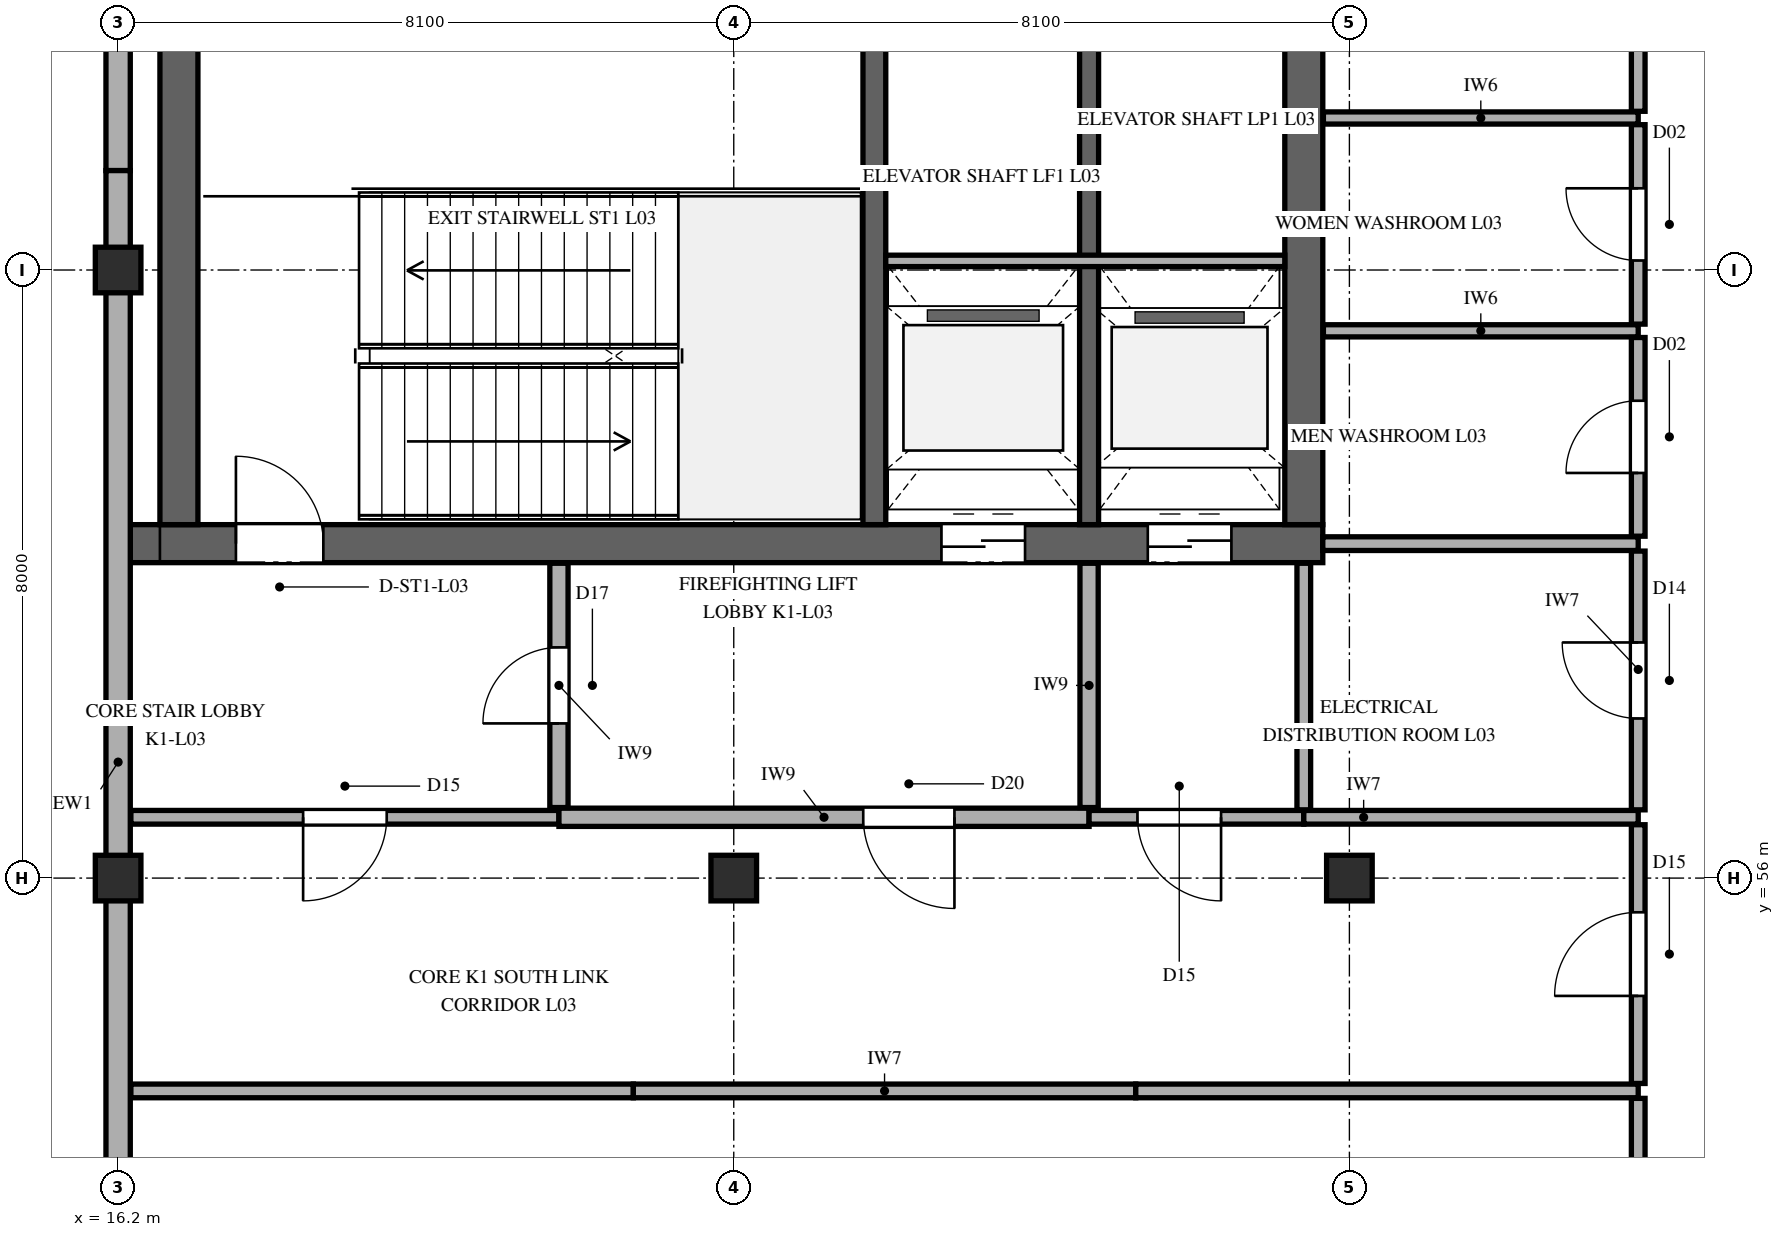
"""IFC4 building model, lengths in metres.
Left out: names, types, materials, properties, quantities, classifications, styles, units other than length and angle.
Written with IfcOpenShell. Run it as: python <this file> out.ifc"""

import sys

from ifc_helpers import new_model, si_unit, direction, frame, frame_2d, origin, origin_2d, place, context, subcontext, project, spatial, rectangle, extrude, element, fill, save


model = new_model("IFC4")
c1 = context("Model", 3, precision=1e-05, world=origin(), true_north=direction((0.0, 1.0)))
c2 = subcontext(c1, "Body", "Model", "MODEL_VIEW")
j1 = project(units=[si_unit("LENGTHUNIT", "METRE"), si_unit("PLANEANGLEUNIT", "RADIAN")], contexts=[c1])
p1 = place(None, origin())
s1 = spatial("IfcSite", under=j1, at=p1, CompositionType="ELEMENT")
p2 = place(p1, origin())
s2 = spatial("IfcBuilding", under=s1, at=p2, CompositionType="ELEMENT")
p3 = place(p2, frame((0.0, 0.0, 14.7)))
s3 = spatial("IfcBuildingStorey", under=s2, at=p3, CompositionType="ELEMENT", Elevation=14.7)
p4 = place(p3, frame((16.36, 60.4, 0.0), z_axis=(0.0, 0.0, 1.0), x_axis=(1.0, 0.0, 0.0)))
e1 = element("IfcWall", 1, at=p4, inside=s3, PredefinedType="SHEAR", context=c2, shape_type="SweptSolid", body=[
    extrude(rectangle(XDim=15.69, YDim=0.5, at=frame_2d((7.845, 0.0))), origin(), (0.0, 0.0, 1.0), 5.1),
])
p5 = place(p4, frame((1.39, 0.0, 0.0)))
e2 = element("IfcOpeningElement", 2, at=p5, cuts=e1, PredefinedType="OPENING", context=c2, shape_type="SweptSolid", body=[
    extrude(rectangle(XDim=1.15, YDim=2.25, at=frame_2d((0.575, 1.125))), frame((0.0, 0.26, 0.0), z_axis=(0.0, -1.0, 0.0), x_axis=(1.0, 0.0, 0.0)), (0.0, 0.0, 1.0), 0.52),
])
p6 = place(p4, frame((10.673, 0.0, 0.0)))
e3 = element("IfcOpeningElement", 3, at=p6, cuts=e1, PredefinedType="OPENING", context=c2, shape_type="SweptSolid", body=[
    extrude(rectangle(XDim=1.1, YDim=2.2, at=frame_2d((0.55, 1.1))), frame((0.0, 0.26, 0.0), z_axis=(0.0, -1.0, 0.0), x_axis=(1.0, 0.0, 0.0)), (0.0, 0.0, 1.0), 0.52),
])
p7 = place(p4, frame((13.387, 0.0, 0.0)))
e4 = element("IfcOpeningElement", 4, at=p7, cuts=e1, PredefinedType="OPENING", context=c2, shape_type="SweptSolid", body=[
    extrude(rectangle(XDim=1.1, YDim=2.2, at=frame_2d((0.55, 1.1))), frame((0.0, 0.26, 0.0), z_axis=(0.0, -1.0, 0.0), x_axis=(1.0, 0.0, 0.0)), (0.0, 0.0, 1.0), 0.52),
])
for number, where, z_axis, x_axis in (
    (5, (17.0, 60.65, 0.0), (0.0, 0.0, 1.0), (0.0, 1.0, 0.0)),
    (6, (31.8, 60.65, 0.0), (0.0, 0.0, 1.0), (0.0, 1.0, 0.0)),
):
    element("IfcWall", number, at=place(p3, frame(where, z_axis=z_axis, x_axis=x_axis)), inside=s3, PredefinedType="SHEAR", context=c2, shape_type="SweptSolid", body=[
        extrude(rectangle(XDim=7.9, YDim=0.5, at=frame_2d((3.95, 0.0))), origin(), (0.0, 0.0, 1.0), 5.1),
    ])
p8 = place(p3, frame((26.15, 60.65, 0.0), z_axis=(0.0, 0.0, 1.0), x_axis=(0.0, 1.0, 0.0)))
e7 = element("IfcWall", 7, at=p8, inside=s3, PredefinedType="SHEAR", context=c2, shape_type="SweptSolid", body=[
    extrude(rectangle(XDim=7.9, YDim=0.3, at=frame_2d((3.95, 0.0))), origin(), (0.0, 0.0, 1.0), 5.1),
])
p9 = place(p3, frame((28.975, 60.65, 0.0), z_axis=(0.0, 0.0, 1.0), x_axis=(0.0, 1.0, 0.0)))
e8 = element("IfcWall", 8, at=p9, inside=s3, PredefinedType="SHEAR", context=c2, shape_type="SweptSolid", body=[
    extrude(rectangle(XDim=7.9, YDim=0.25, at=frame_2d((3.95, 0.0))), origin(), (0.0, 0.0, 1.0), 5.1),
])
for number, where, z_axis, x_axis in (
    (9, (16.2, 56.0, 0.0), (0.0, 0.0, 1.0), (1.0, 0.0, 0.0)),
    (10, (16.2, 64.0, 0.0), (0.0, 0.0, 1.0), (1.0, 0.0, 0.0)),
    (11, (24.3, 56.0, 0.0), (0.0, 0.0, 1.0), (1.0, 0.0, 0.0)),
    (12, (32.4, 56.0, 0.0), (0.0, 0.0, 1.0), (1.0, 0.0, 0.0)),
):
    element("IfcColumn", number, at=place(p3, frame(where, z_axis=z_axis, x_axis=x_axis)), inside=s3, PredefinedType="COLUMN", context=c2, shape_type="SweptSolid", body=[
        extrude(rectangle(XDim=0.6, YDim=0.6, at=origin_2d()), origin(), (0.0, 0.0, 1.0), 5.1),
    ])
p10 = place(p3, frame((16.2, 80.872, 0.0), z_axis=(0.0, 0.0, 1.0), x_axis=(0.0, -1.0, 0.0)))
e13 = element("IfcWall", 13, at=p10, inside=s3, PredefinedType="SOLIDWALL", context=c2, shape_type="SweptSolid", body=[
    extrude(rectangle(XDim=15.564, YDim=0.32, at=frame_2d((7.782, 0.0))), origin(), (0.0, 0.0, 1.0), 4.332),
])
p11 = place(p10, frame((3.6, 0.0, 0.95)))
e14 = element("IfcOpeningElement", 14, at=p11, cuts=e13, PredefinedType="OPENING", context=c2, shape_type="SweptSolid", body=[
    extrude(rectangle(XDim=3.6, YDim=1.8, at=frame_2d((1.8, 0.9))), frame((0.0, 0.17, 0.0), z_axis=(0.0, -1.0, 0.0), x_axis=(1.0, 0.0, 0.0)), (0.0, 0.0, 1.0), 0.34),
])
p12 = place(p3, frame((16.2, 65.308, 0.0), z_axis=(0.0, 0.0, 1.0), x_axis=(0.0, -1.0, 0.0)))
e15 = element("IfcWall", 15, at=p12, inside=s3, PredefinedType="SOLIDWALL", context=c2, shape_type="SweptSolid", body=[
    extrude(rectangle(XDim=15.564, YDim=0.32, at=frame_2d((7.782, 0.0))), origin(), (0.0, 0.0, 1.0), 4.332),
])
p13 = place(p3, frame((26.3, 64.12, 0.0), z_axis=(0.0, 0.0, 1.0), x_axis=(1.0, 0.0, 0.0)))
e16 = element("IfcWall", 16, at=p13, inside=s3, PredefinedType="PARTITIONING", context=c2, shape_type="SweptSolid", body=[
    extrude(rectangle(XDim=5.25, YDim=0.15, at=frame_2d((2.625, 0.0))), origin(), (0.0, 0.0, 1.0), 4.84),
])
p14 = place(p3, frame((16.368, 53.2, 0.0), z_axis=(0.0, 0.0, 1.0), x_axis=(1.0, 0.0, 0.0)))
e17 = element("IfcWall", 17, at=p14, inside=s3, PredefinedType="PARTITIONING", context=c2, shape_type="SweptSolid", body=[
    extrude(rectangle(XDim=6.611, YDim=0.18, at=frame_2d((3.305, 0.0))), origin(), (0.0, 0.0, 1.0), 4.84),
])
for number, where, z_axis, x_axis in (
    (18, (22.979, 53.2, 0.0), (0.0, 0.0, 1.0), (1.0, 0.0, 0.0)),
    (19, (29.589, 53.2, 0.0), (0.0, 0.0, 1.0), (1.0, 0.0, 0.0)),
):
    element("IfcWall", number, at=place(p3, frame(where, z_axis=z_axis, x_axis=x_axis)), inside=s3, PredefinedType="PARTITIONING", context=c2, shape_type="SweptSolid", body=[
        extrude(rectangle(XDim=6.611, YDim=0.18, at=frame_2d((3.305, 0.0))), origin(), (0.0, 0.0, 1.0), 4.84),
    ])
p15 = place(p3, frame((16.368, 56.8, 0.0), z_axis=(0.0, 0.0, 1.0), x_axis=(1.0, 0.0, 0.0)))
e20 = element("IfcWall", 20, at=p15, inside=s3, PredefinedType="PARTITIONING", context=c2, shape_type="SweptSolid", body=[
    extrude(rectangle(XDim=5.632, YDim=0.18, at=frame_2d((2.816, 0.0))), origin(), (0.0, 0.0, 1.0), 4.84),
])
p16 = place(p15, frame((2.266, 0.0, 0.0)))
e21 = element("IfcOpeningElement", 21, at=p16, cuts=e20, PredefinedType="OPENING", context=c2, shape_type="SweptSolid", body=[
    extrude(rectangle(XDim=1.1, YDim=2.2, at=frame_2d((0.55, 1.1))), frame((0.0, 0.1, 0.0), z_axis=(0.0, -1.0, 0.0), x_axis=(1.0, 0.0, 0.0)), (0.0, 0.0, 1.0), 0.2),
])
p17 = place(p3, frame((22.0, 56.8, 0.0), z_axis=(0.0, 0.0, 1.0), x_axis=(1.0, 0.0, 0.0)))
e22 = element("IfcWall", 22, at=p17, inside=s3, PredefinedType="PARTITIONING", context=c2, shape_type="SweptSolid", body=[
    extrude(rectangle(XDim=6.975, YDim=0.24, at=frame_2d((3.488, 0.0))), origin(), (0.0, 0.0, 1.0), 4.84),
])
p18 = place(p17, frame((4.003, 0.0, 0.0)))
e23 = element("IfcOpeningElement", 23, at=p18, cuts=e22, PredefinedType="OPENING", context=c2, shape_type="SweptSolid", body=[
    extrude(rectangle(XDim=1.2, YDim=2.3, at=frame_2d((0.6, 1.15))), frame((0.0, 0.13, 0.0), z_axis=(0.0, -1.0, 0.0), x_axis=(1.0, 0.0, 0.0)), (0.0, 0.0, 1.0), 0.26),
])
p19 = place(p3, frame((28.975, 56.8, 0.0), z_axis=(0.0, 0.0, 1.0), x_axis=(1.0, 0.0, 0.0)))
e24 = element("IfcWall", 24, at=p19, inside=s3, PredefinedType="PARTITIONING", context=c2, shape_type="SweptSolid", body=[
    extrude(rectangle(XDim=2.825, YDim=0.18, at=frame_2d((1.413, 0.0))), origin(), (0.0, 0.0, 1.0), 4.84),
])
p20 = place(p19, frame((0.636, 0.0, 0.0)))
e25 = element("IfcOpeningElement", 25, at=p20, cuts=e24, PredefinedType="OPENING", context=c2, shape_type="SweptSolid", body=[
    extrude(rectangle(XDim=1.1, YDim=2.2, at=frame_2d((0.55, 1.1))), frame((0.0, 0.1, 0.0), z_axis=(0.0, -1.0, 0.0), x_axis=(1.0, 0.0, 0.0)), (0.0, 0.0, 1.0), 0.2),
])
p21 = place(p3, frame((31.8, 56.8, 0.0), z_axis=(0.0, 0.0, 1.0), x_axis=(1.0, 0.0, 0.0)))
e26 = element("IfcWall", 26, at=p21, inside=s3, PredefinedType="PARTITIONING", context=c2, shape_type="SweptSolid", body=[
    extrude(rectangle(XDim=4.4, YDim=0.18, at=frame_2d((2.2, 0.0))), origin(), (0.0, 0.0, 1.0), 4.84),
])
p22 = place(p3, frame((32.05, 60.4, 0.0), z_axis=(0.0, 0.0, 1.0), x_axis=(1.0, 0.0, 0.0)))
e27 = element("IfcWall", 27, at=p22, inside=s3, PredefinedType="PARTITIONING", context=c2, shape_type="SweptSolid", body=[
    extrude(rectangle(XDim=4.15, YDim=0.18, at=frame_2d((2.075, 0.0))), origin(), (0.0, 0.0, 1.0), 4.84),
])
for number, where, z_axis, x_axis in (
    (28, (32.058, 63.2, 0.0), (0.0, 0.0, 1.0), (1.0, 0.0, 0.0)),
    (29, (32.058, 66.0, 0.0), (0.0, 0.0, 1.0), (1.0, 0.0, 0.0)),
):
    element("IfcWall", number, at=place(p3, frame(where, z_axis=z_axis, x_axis=x_axis)), inside=s3, PredefinedType="PARTITIONING", context=c2, shape_type="SweptSolid", body=[
        extrude(rectangle(XDim=4.142, YDim=0.16, at=frame_2d((2.071, 0.0))), origin(), (0.0, 0.0, 1.0), 4.84),
    ])
p23 = place(p3, frame((22.0, 56.928, 0.0), z_axis=(0.0, 0.0, 1.0), x_axis=(0.0, 1.0, 0.0)))
e30 = element("IfcWall", 30, at=p23, inside=s3, PredefinedType="PARTITIONING", context=c2, shape_type="SweptSolid", body=[
    extrude(rectangle(XDim=3.214, YDim=0.24, at=frame_2d((1.607, 0.0))), origin(), (0.0, 0.0, 1.0), 4.84),
])
p24 = place(p23, frame((1.107, 0.0, 0.0)))
e31 = element("IfcOpeningElement", 31, at=p24, cuts=e30, PredefinedType="OPENING", context=c2, shape_type="SweptSolid", body=[
    extrude(rectangle(XDim=1.0, YDim=2.2, at=frame_2d((0.5, 1.1))), frame((0.0, 0.13, 0.0), z_axis=(0.0, -1.0, 0.0), x_axis=(1.0, 0.0, 0.0)), (0.0, 0.0, 1.0), 0.26),
])
p25 = place(p3, frame((28.975, 56.928, 0.0), z_axis=(0.0, 0.0, 1.0), x_axis=(0.0, 1.0, 0.0)))
e32 = element("IfcWall", 32, at=p25, inside=s3, PredefinedType="PARTITIONING", context=c2, shape_type="SweptSolid", body=[
    extrude(rectangle(XDim=3.214, YDim=0.24, at=frame_2d((1.607, 0.0))), origin(), (0.0, 0.0, 1.0), 4.84),
])
p26 = place(p3, frame((31.8, 56.898, 0.0), z_axis=(0.0, 0.0, 1.0), x_axis=(0.0, 1.0, 0.0)))
e33 = element("IfcWall", 33, at=p26, inside=s3, PredefinedType="PARTITIONING", context=c2, shape_type="SweptSolid", body=[
    extrude(rectangle(XDim=3.244, YDim=0.18, at=frame_2d((1.622, 0.0))), origin(), (0.0, 0.0, 1.0), 4.84),
])
p27 = place(p3, frame((36.2, 34.098, 0.0), z_axis=(0.0, 0.0, 1.0), x_axis=(0.0, 1.0, 0.0)))
e34 = element("IfcWall", 34, at=p27, inside=s3, PredefinedType="PARTITIONING", context=c2, shape_type="SweptSolid", body=[
    extrude(rectangle(XDim=19.004, YDim=0.18, at=frame_2d((9.502, 0.0))), origin(), (0.0, 0.0, 1.0), 4.425),
])
p28 = place(p27, frame((8.952, 0.0, 0.0)))
e35 = element("IfcOpeningElement", 35, at=p28, cuts=e34, PredefinedType="OPENING", context=c2, shape_type="SweptSolid", body=[
    extrude(rectangle(XDim=1.1, YDim=2.2, at=frame_2d((0.55, 1.1))), frame((0.0, 0.1, 0.0), z_axis=(0.0, -1.0, 0.0), x_axis=(1.0, 0.0, 0.0)), (0.0, 0.0, 1.0), 0.2),
])
p29 = place(p3, frame((36.2, 53.298, 0.0), z_axis=(0.0, 0.0, 1.0), x_axis=(0.0, 1.0, 0.0)))
e36 = element("IfcWall", 36, at=p29, inside=s3, PredefinedType="PARTITIONING", context=c2, shape_type="SweptSolid", body=[
    extrude(rectangle(XDim=3.404, YDim=0.18, at=frame_2d((1.702, 0.0))), origin(), (0.0, 0.0, 1.0), 4.425),
])
p30 = place(p29, frame((1.152, 0.0, 0.0)))
e37 = element("IfcOpeningElement", 37, at=p30, cuts=e36, PredefinedType="OPENING", context=c2, shape_type="SweptSolid", body=[
    extrude(rectangle(XDim=1.1, YDim=2.2, at=frame_2d((0.55, 1.1))), frame((0.0, 0.1, 0.0), z_axis=(0.0, -1.0, 0.0), x_axis=(1.0, 0.0, 0.0)), (0.0, 0.0, 1.0), 0.2),
])
p31 = place(p3, frame((36.2, 56.898, 0.0), z_axis=(0.0, 0.0, 1.0), x_axis=(0.0, 1.0, 0.0)))
e38 = element("IfcWall", 38, at=p31, inside=s3, PredefinedType="PARTITIONING", context=c2, shape_type="SweptSolid", body=[
    extrude(rectangle(XDim=3.404, YDim=0.18, at=frame_2d((1.702, 0.0))), origin(), (0.0, 0.0, 1.0), 4.84),
])
p32 = place(p31, frame((1.202, 0.0, 0.0)))
e39 = element("IfcOpeningElement", 39, at=p32, cuts=e38, PredefinedType="OPENING", context=c2, shape_type="SweptSolid", body=[
    extrude(rectangle(XDim=1.0, YDim=2.15, at=frame_2d((0.5, 1.075))), frame((0.0, 0.1, 0.0), z_axis=(0.0, -1.0, 0.0), x_axis=(1.0, 0.0, 0.0)), (0.0, 0.0, 1.0), 0.2),
])
p33 = place(p3, frame((36.2, 60.498, 0.0), z_axis=(0.0, 0.0, 1.0), x_axis=(0.0, 1.0, 0.0)))
e40 = element("IfcWall", 40, at=p33, inside=s3, PredefinedType="PARTITIONING", context=c2, shape_type="SweptSolid", body=[
    extrude(rectangle(XDim=2.614, YDim=0.18, at=frame_2d((1.307, 0.0))), origin(), (0.0, 0.0, 1.0), 4.84),
])
p34 = place(p33, frame((0.832, 0.0, 0.0)))
e41 = element("IfcOpeningElement", 41, at=p34, cuts=e40, PredefinedType="OPENING", context=c2, shape_type="SweptSolid", body=[
    extrude(rectangle(XDim=0.95, YDim=2.1, at=frame_2d((0.475, 1.05))), frame((0.0, 0.1, 0.0), z_axis=(0.0, -1.0, 0.0), x_axis=(1.0, 0.0, 0.0)), (0.0, 0.0, 1.0), 0.2),
])
p35 = place(p3, frame((36.2, 63.288, 0.0), z_axis=(0.0, 0.0, 1.0), x_axis=(0.0, 1.0, 0.0)))
e42 = element("IfcWall", 42, at=p35, inside=s3, PredefinedType="PARTITIONING", context=c2, shape_type="SweptSolid", body=[
    extrude(rectangle(XDim=2.624, YDim=0.18, at=frame_2d((1.312, 0.0))), origin(), (0.0, 0.0, 1.0), 4.84),
])
p36 = place(p35, frame((0.837, 0.0, 0.0)))
e43 = element("IfcOpeningElement", 43, at=p36, cuts=e42, PredefinedType="OPENING", context=c2, shape_type="SweptSolid", body=[
    extrude(rectangle(XDim=0.95, YDim=2.1, at=frame_2d((0.475, 1.05))), frame((0.0, 0.1, 0.0), z_axis=(0.0, -1.0, 0.0), x_axis=(1.0, 0.0, 0.0)), (0.0, 0.0, 1.0), 0.2),
])
p37 = place(p3, frame((36.2, 66.088, 0.0), z_axis=(0.0, 0.0, 1.0), x_axis=(0.0, 1.0, 0.0)))
e44 = element("IfcWall", 44, at=p37, inside=s3, PredefinedType="PARTITIONING", context=c2, shape_type="SweptSolid", body=[
    extrude(rectangle(XDim=2.624, YDim=0.18, at=frame_2d((1.312, 0.0))), origin(), (0.0, 0.0, 1.0), 4.84),
])
p38 = place(p37, frame((0.812, 0.0, 0.0)))
e45 = element("IfcOpeningElement", 45, at=p38, cuts=e44, PredefinedType="OPENING", context=c2, shape_type="SweptSolid", body=[
    extrude(rectangle(XDim=1.0, YDim=2.15, at=frame_2d((0.5, 1.075))), frame((0.0, 0.1, 0.0), z_axis=(0.0, -1.0, 0.0), x_axis=(1.0, 0.0, 0.0)), (0.0, 0.0, 1.0), 0.2),
])
p39 = place(p5, origin())
e46 = element("IfcDoor", 46, at=p39, inside=s3, OperationType="SINGLE_SWING_LEFT", PredefinedType="DOOR", context=c2, shape_type="SweptSolid", body=[
    extrude(rectangle(XDim=1.15, YDim=2.25, at=frame_2d((0.575, 1.125))), frame((0.0, 0.025, 0.0), z_axis=(0.0, -1.0, 0.0), x_axis=(1.0, 0.0, 0.0)), (0.0, 0.0, 1.0), 0.05),
])
fill(e2, e46)
p40 = place(p6, frame((1.1, 0.0, 0.0), z_axis=(0.0, 0.0, 1.0), x_axis=(-1.0, 0.0, 0.0)))
e47 = element("IfcDoor", 47, at=p40, inside=s3, OperationType="DOUBLE_DOOR_SLIDING", PredefinedType="DOOR", context=c2, shape_type="SweptSolid", body=[
    extrude(rectangle(XDim=1.1, YDim=2.2, at=frame_2d((0.55, 1.1))), frame((0.0, 0.025, 0.0), z_axis=(0.0, -1.0, 0.0), x_axis=(1.0, 0.0, 0.0)), (0.0, 0.0, 1.0), 0.05),
])
fill(e3, e47)
p41 = place(p7, frame((1.1, 0.0, 0.0), z_axis=(0.0, 0.0, 1.0), x_axis=(-1.0, 0.0, 0.0)))
e48 = element("IfcDoor", 48, at=p41, inside=s3, OperationType="DOUBLE_DOOR_SLIDING", PredefinedType="DOOR", context=c2, shape_type="SweptSolid", body=[
    extrude(rectangle(XDim=1.1, YDim=2.2, at=frame_2d((0.55, 1.1))), frame((0.0, 0.025, 0.0), z_axis=(0.0, -1.0, 0.0), x_axis=(1.0, 0.0, 0.0)), (0.0, 0.0, 1.0), 0.05),
])
fill(e4, e48)
p42 = place(p16, frame((1.1, 0.0, 0.0), z_axis=(0.0, 0.0, 1.0), x_axis=(-1.0, 0.0, 0.0)))
e49 = element("IfcDoor", 49, at=p42, inside=s3, OperationType="SINGLE_SWING_LEFT", PredefinedType="DOOR", context=c2, shape_type="SweptSolid", body=[
    extrude(rectangle(XDim=1.1, YDim=2.2, at=frame_2d((0.55, 1.1))), frame((0.0, 0.025, 0.0), z_axis=(0.0, -1.0, 0.0), x_axis=(1.0, 0.0, 0.0)), (0.0, 0.0, 1.0), 0.05),
])
fill(e21, e49)
p43 = place(p18, frame((1.2, 0.0, 0.0), z_axis=(0.0, 0.0, 1.0), x_axis=(-1.0, 0.0, 0.0)))
e50 = element("IfcDoor", 50, at=p43, inside=s3, OperationType="SINGLE_SWING_RIGHT", PredefinedType="DOOR", context=c2, shape_type="SweptSolid", body=[
    extrude(rectangle(XDim=1.2, YDim=2.3, at=frame_2d((0.6, 1.15))), frame((0.0, 0.025, 0.0), z_axis=(0.0, -1.0, 0.0), x_axis=(1.0, 0.0, 0.0)), (0.0, 0.0, 1.0), 0.05),
])
fill(e23, e50)
p44 = place(p20, frame((1.1, 0.0, 0.0), z_axis=(0.0, 0.0, 1.0), x_axis=(-1.0, 0.0, 0.0)))
e51 = element("IfcDoor", 51, at=p44, inside=s3, OperationType="SINGLE_SWING_RIGHT", PredefinedType="DOOR", context=c2, shape_type="SweptSolid", body=[
    extrude(rectangle(XDim=1.1, YDim=2.2, at=frame_2d((0.55, 1.1))), frame((0.0, 0.025, 0.0), z_axis=(0.0, -1.0, 0.0), x_axis=(1.0, 0.0, 0.0)), (0.0, 0.0, 1.0), 0.05),
])
fill(e25, e51)
p45 = place(p24, origin())
e52 = element("IfcDoor", 52, at=p45, inside=s3, OperationType="SINGLE_SWING_LEFT", PredefinedType="DOOR", context=c2, shape_type="SweptSolid", body=[
    extrude(rectangle(XDim=1.0, YDim=2.2, at=frame_2d((0.5, 1.1))), frame((0.0, 0.025, 0.0), z_axis=(0.0, -1.0, 0.0), x_axis=(1.0, 0.0, 0.0)), (0.0, 0.0, 1.0), 0.05),
])
fill(e31, e52)
p46 = place(p30, origin())
e53 = element("IfcDoor", 53, at=p46, inside=s3, OperationType="SINGLE_SWING_LEFT", PredefinedType="DOOR", context=c2, shape_type="SweptSolid", body=[
    extrude(rectangle(XDim=1.1, YDim=2.2, at=frame_2d((0.55, 1.1))), frame((0.0, 0.025, 0.0), z_axis=(0.0, -1.0, 0.0), x_axis=(1.0, 0.0, 0.0)), (0.0, 0.0, 1.0), 0.05),
])
fill(e37, e53)
p47 = place(p32, origin())
e54 = element("IfcDoor", 54, at=p47, inside=s3, OperationType="SINGLE_SWING_RIGHT", PredefinedType="DOOR", context=c2, shape_type="SweptSolid", body=[
    extrude(rectangle(XDim=1.0, YDim=2.15, at=frame_2d((0.5, 1.075))), frame((0.0, 0.025, 0.0), z_axis=(0.0, -1.0, 0.0), x_axis=(1.0, 0.0, 0.0)), (0.0, 0.0, 1.0), 0.05),
])
fill(e39, e54)
p48 = place(p34, origin())
e55 = element("IfcDoor", 55, at=p48, inside=s3, OperationType="SINGLE_SWING_LEFT", PredefinedType="DOOR", context=c2, shape_type="SweptSolid", body=[
    extrude(rectangle(XDim=0.95, YDim=2.1, at=frame_2d((0.475, 1.05))), frame((0.0, 0.025, 0.0), z_axis=(0.0, -1.0, 0.0), x_axis=(1.0, 0.0, 0.0)), (0.0, 0.0, 1.0), 0.05),
])
fill(e41, e55)
p49 = place(p36, origin())
e56 = element("IfcDoor", 56, at=p49, inside=s3, OperationType="SINGLE_SWING_RIGHT", PredefinedType="DOOR", context=c2, shape_type="SweptSolid", body=[
    extrude(rectangle(XDim=0.95, YDim=2.1, at=frame_2d((0.475, 1.05))), frame((0.0, 0.025, 0.0), z_axis=(0.0, -1.0, 0.0), x_axis=(1.0, 0.0, 0.0)), (0.0, 0.0, 1.0), 0.05),
])
fill(e43, e56)
save(model, sys.argv[1])
